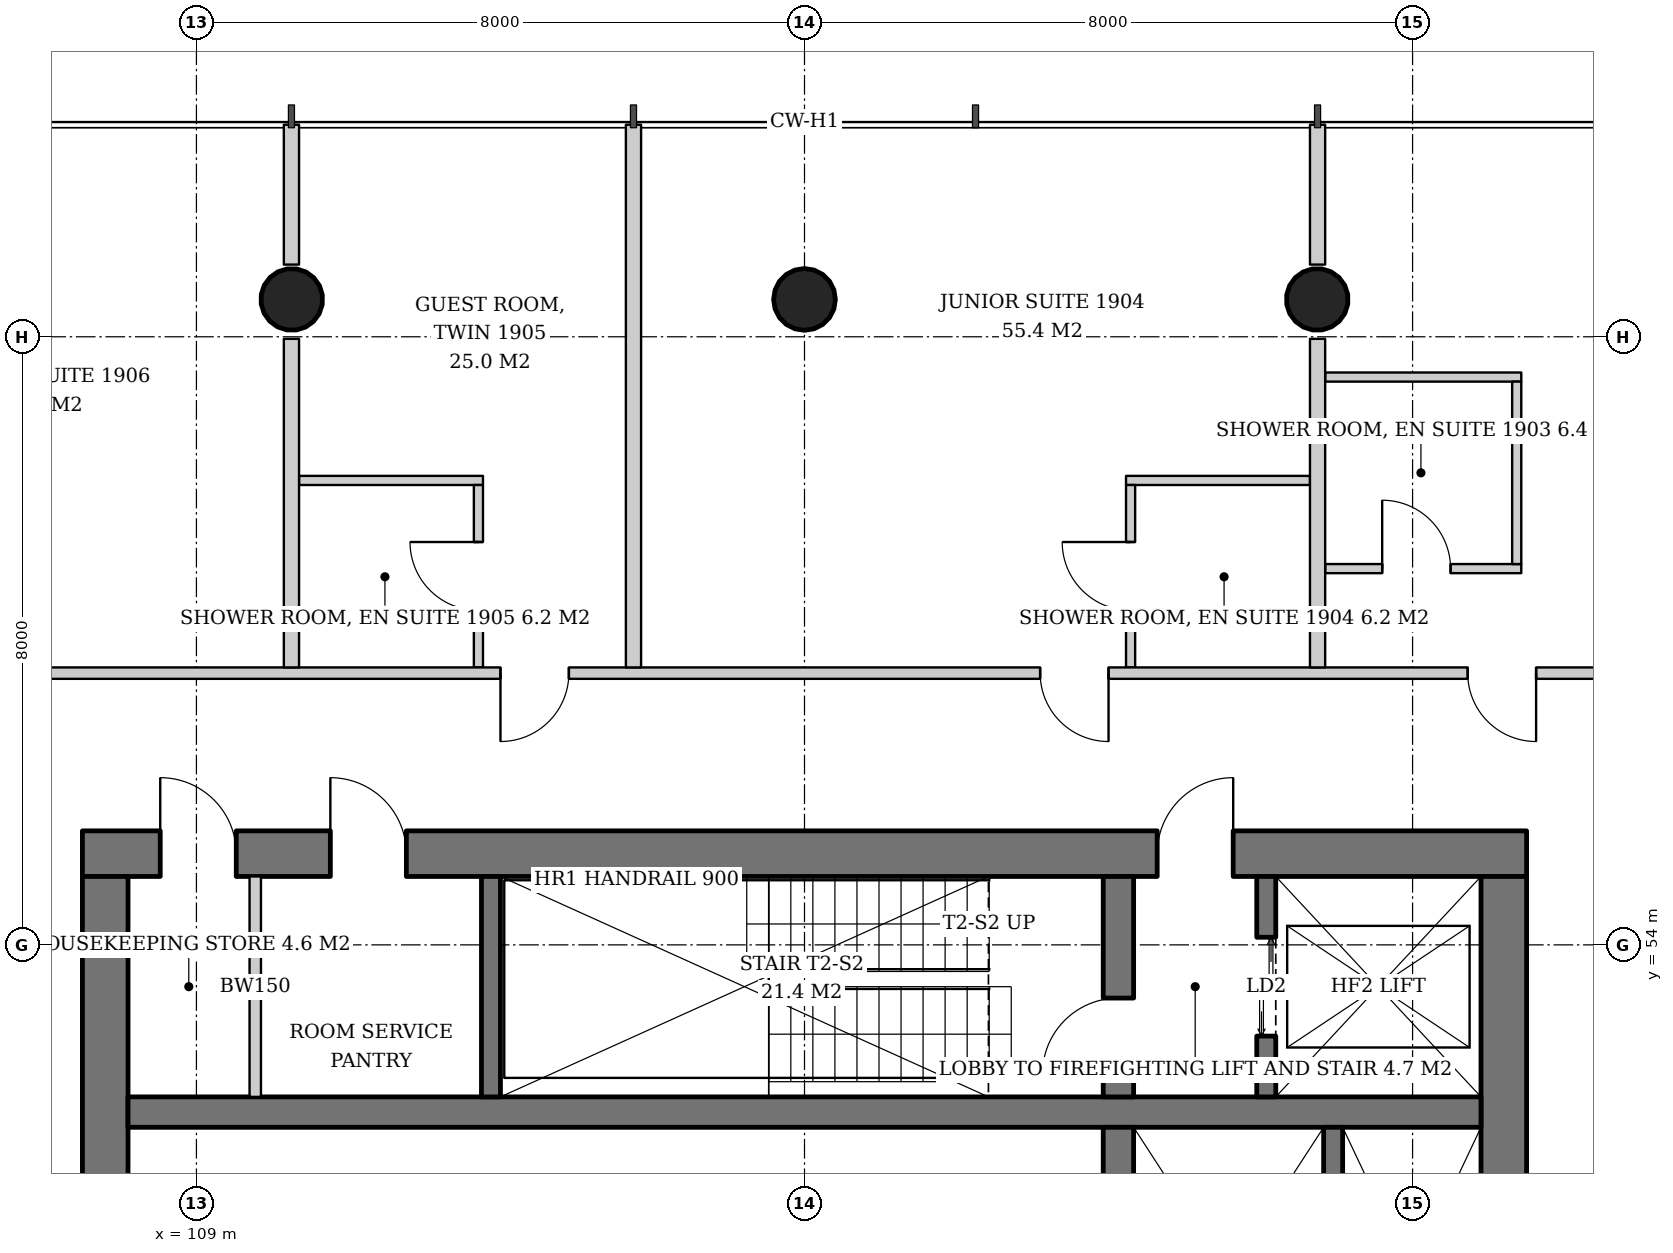
"""IFC4 building model, lengths in metres.
Left out: names, types, materials, properties, quantities, classifications, styles, units other than length and angle.
Written with IfcOpenShell. Run it as: python <this file> out.ifc"""

import sys

from ifc_helpers import new_model, si_unit, direction, frame, frame_2d, origin, origin_2d, place, context, subcontext, project, spatial, rectangle, hollow_circle, extrude, element, fill, save


model = new_model("IFC4")
c1 = context("Model", 3, precision=1e-05, world=origin(), true_north=direction((0.0, 1.0)))
c2 = subcontext(c1, "Body", "Model", "MODEL_VIEW")
j1 = project(units=[si_unit("LENGTHUNIT", "METRE"), si_unit("PLANEANGLEUNIT", "RADIAN")], contexts=[c1])
p1 = place(None, origin())
s1 = spatial("IfcSite", under=j1, at=p1, CompositionType="ELEMENT")
p2 = place(p1, origin())
s2 = spatial("IfcBuilding", under=s1, at=p2, CompositionType="ELEMENT")
p3 = place(p2, frame((0.0, 0.0, 78.0)))
s3 = spatial("IfcBuildingStorey", under=s2, at=p3, CompositionType="ELEMENT", Elevation=78.0)
p4 = place(p3, frame((123.771, 62.543, 0.0), z_axis=(-0.021497706284, -0.043059584825, 0.998841188968), x_axis=(0.894693706707, -0.446680166538, 0.0)))
e1 = element("IfcColumn", 1, at=p4, inside=s3, PredefinedType="COLUMN", context=c2, shape_type="SweptSolid", body=[
    extrude(hollow_circle(Radius=0.406, WallThickness=0.03, at=origin_2d()), origin(), (0.0, 0.0, 1.0), 3.804),
])
p5 = place(p3, frame((117.0, 62.543, 0.0), z_axis=(0.0, -0.043069538298, 0.999072076915), x_axis=(1.0, 0.0, 0.0)))
e2 = element("IfcColumn", 2, at=p5, inside=s3, PredefinedType="COLUMN", context=c2, shape_type="SweptSolid", body=[
    extrude(hollow_circle(Radius=0.406, WallThickness=0.03, at=origin_2d()), origin(), (0.0, 0.0, 1.0), 3.803),
])
p6 = place(p3, frame((110.229, 62.543, 0.0), z_axis=(0.021497706284, -0.043059584825, 0.998841188968), x_axis=(0.894693706707, 0.446680166538, 0.0)))
e3 = element("IfcColumn", 3, at=p6, inside=s3, PredefinedType="COLUMN", context=c2, shape_type="SweptSolid", body=[
    extrude(hollow_circle(Radius=0.406, WallThickness=0.03, at=origin_2d()), origin(), (0.0, 0.0, 1.0), 3.804),
])
p7 = place(p3, frame((107.5, 55.2, 0.0), z_axis=(0.0, 0.0, 1.0), x_axis=(1.0, 0.0, 0.0)))
e4 = element("IfcWall", 4, at=p7, inside=s3, PredefinedType="SHEAR", context=c2, shape_type="SweptSolid", body=[
    extrude(rectangle(XDim=19.0, YDim=0.6, at=frame_2d((9.5, 0.0))), origin(), (0.0, 0.0, 1.0), 3.8),
])
p8 = place(p7, frame((14.14, 0.0, 0.0)))
e5 = element("IfcOpeningElement", 5, at=p8, cuts=e4, PredefinedType="OPENING", context=c2, shape_type="SweptSolid", body=[
    extrude(rectangle(XDim=1.0, YDim=2.1, at=frame_2d((0.5, 1.05))), frame((0.0, 0.31, 0.0), z_axis=(0.0, -1.0, 0.0), x_axis=(1.0, 0.0, 0.0)), (0.0, 0.0, 1.0), 0.62),
])
p9 = place(p7, frame((1.024, 0.0, 0.0)))
e6 = element("IfcOpeningElement", 6, at=p9, cuts=e4, PredefinedType="OPENING", context=c2, shape_type="SweptSolid", body=[
    extrude(rectangle(XDim=1.0, YDim=2.1, at=frame_2d((0.5, 1.05))), frame((0.0, 0.31, 0.0), z_axis=(0.0, -1.0, 0.0), x_axis=(1.0, 0.0, 0.0)), (0.0, 0.0, 1.0), 0.62),
])
p10 = place(p7, frame((3.262, 0.0, 0.0)))
e7 = element("IfcOpeningElement", 7, at=p10, cuts=e4, PredefinedType="OPENING", context=c2, shape_type="SweptSolid", body=[
    extrude(rectangle(XDim=1.0, YDim=2.1, at=frame_2d((0.5, 1.05))), frame((0.0, 0.31, 0.0), z_axis=(0.0, -1.0, 0.0), x_axis=(1.0, 0.0, 0.0)), (0.0, 0.0, 1.0), 0.62),
])
p11 = place(p3, frame((107.8, 37.1, 0.0), z_axis=(0.0, 0.0, 1.0), x_axis=(0.0, 1.0, 0.0)))
e8 = element("IfcWall", 8, at=p11, inside=s3, PredefinedType="SHEAR", context=c2, shape_type="SweptSolid", body=[
    extrude(rectangle(XDim=17.8, YDim=0.6, at=frame_2d((8.9, 0.0))), origin(), (0.0, 0.0, 1.0), 3.8),
])
p12 = place(p11, frame((8.0, 0.0, 0.0)))
e9 = element("IfcOpeningElement", 9, at=p12, cuts=e8, PredefinedType="OPENING", context=c2, shape_type="SweptSolid", body=[
    extrude(rectangle(XDim=1.8, YDim=2.4, at=frame_2d((0.9, 1.2))), frame((0.0, 0.31, 0.0), z_axis=(0.0, -1.0, 0.0), x_axis=(1.0, 0.0, 0.0)), (0.0, 0.0, 1.0), 0.62),
])
p13 = place(p3, frame((126.2, 37.1, 0.0), z_axis=(0.0, 0.0, 1.0), x_axis=(0.0, 1.0, 0.0)))
e10 = element("IfcWall", 10, at=p13, inside=s3, PredefinedType="SHEAR", context=c2, shape_type="SweptSolid", body=[
    extrude(rectangle(XDim=17.8, YDim=0.6, at=frame_2d((8.9, 0.0))), origin(), (0.0, 0.0, 1.0), 3.8),
])
p14 = place(p13, frame((8.0, 0.0, 0.0)))
e11 = element("IfcOpeningElement", 11, at=p14, cuts=e10, PredefinedType="OPENING", context=c2, shape_type="SweptSolid", body=[
    extrude(rectangle(XDim=1.8, YDim=2.4, at=frame_2d((0.9, 1.2))), frame((0.0, 0.31, 0.0), z_axis=(0.0, -1.0, 0.0), x_axis=(1.0, 0.0, 0.0)), (0.0, 0.0, 1.0), 0.62),
])
p15 = place(p3, frame((108.1, 51.8, 0.0), z_axis=(0.0, 0.0, 1.0), x_axis=(1.0, 0.0, 0.0)))
e12 = element("IfcWall", 12, at=p15, inside=s3, PredefinedType="SHEAR", context=c2, shape_type="SweptSolid", body=[
    extrude(rectangle(XDim=17.8, YDim=0.4, at=frame_2d((8.9, 0.0))), origin(), (0.0, 0.0, 1.0), 3.8),
])
p16 = place(p3, frame((121.13, 40.4, 0.0), z_axis=(0.0, 0.0, 1.0), x_axis=(0.0, 1.0, 0.0)))
e13 = element("IfcWall", 13, at=p16, inside=s3, PredefinedType="SHEAR", context=c2, shape_type="SweptSolid", body=[
    extrude(rectangle(XDim=11.2, YDim=0.4, at=frame_2d((5.6, 0.0))), origin(), (0.0, 0.0, 1.0), 3.8),
])
p17 = place(p3, frame((121.13, 52.0, 0.0), z_axis=(0.0, 0.0, 1.0), x_axis=(0.0, 1.0, 0.0)))
e14 = element("IfcWall", 14, at=p17, inside=s3, PredefinedType="SHEAR", context=c2, shape_type="SweptSolid", body=[
    extrude(rectangle(XDim=2.9, YDim=0.4, at=frame_2d((1.45, 0.0))), origin(), (0.0, 0.0, 1.0), 3.8),
])
p18 = place(p17, frame((0.3, 0.0, 0.0)))
e15 = element("IfcOpeningElement", 15, at=p18, cuts=e14, PredefinedType="OPENING", context=c2, shape_type="SweptSolid", body=[
    extrude(rectangle(XDim=1.0, YDim=2.1, at=frame_2d((0.5, 1.05))), frame((0.0, 0.21, 0.0), z_axis=(0.0, -1.0, 0.0), x_axis=(1.0, 0.0, 0.0)), (0.0, 0.0, 1.0), 0.42),
])
p19 = place(p3, frame((112.875, 52.0, 0.0), z_axis=(0.0, 0.0, 1.0), x_axis=(0.0, 1.0, 0.0)))
e16 = element("IfcWall", 16, at=p19, inside=s3, PredefinedType="SHEAR", context=c2, shape_type="SweptSolid", body=[
    extrude(rectangle(XDim=2.9, YDim=0.25, at=frame_2d((1.45, 0.0))), origin(), (0.0, 0.0, 1.0), 3.8),
])
p20 = place(p3, frame((123.075, 52.0, 0.0), z_axis=(0.0, 0.0, 1.0), x_axis=(0.0, 1.0, 0.0)))
e17 = element("IfcWall", 17, at=p20, inside=s3, PredefinedType="SHEAR", context=c2, shape_type="SweptSolid", body=[
    extrude(rectangle(XDim=2.9, YDim=0.25, at=frame_2d((1.45, 0.0))), origin(), (0.0, 0.0, 1.0), 3.8),
])
p21 = place(p20, frame((0.8, 0.0, 0.0)))
e18 = element("IfcOpeningElement", 18, at=p21, cuts=e17, PredefinedType="OPENING", context=c2, shape_type="SweptSolid", body=[
    extrude(rectangle(XDim=1.3, YDim=2.2, at=frame_2d((0.65, 1.1))), frame((0.0, 0.135, 0.0), z_axis=(0.0, -1.0, 0.0), x_axis=(1.0, 0.0, 0.0)), (0.0, 0.0, 1.0), 0.27),
])
p22 = place(p3, frame((123.955, 47.75, 0.0), z_axis=(0.0, 0.0, 1.0), x_axis=(0.0, 1.0, 0.0)))
e19 = element("IfcWall", 19, at=p22, inside=s3, PredefinedType="SHEAR", context=c2, shape_type="SweptSolid", body=[
    extrude(rectangle(XDim=3.85, YDim=0.25, at=frame_2d((1.925, 0.0))), origin(), (0.0, 0.0, 1.0), 3.8),
])
p23 = place(p3, frame((109.774, 52.0, 0.0), z_axis=(0.0, 0.0, 1.0), x_axis=(0.0, 1.0, 0.0)))
e20 = element("IfcWall", 20, at=p23, inside=s3, PredefinedType="SOLIDWALL", context=c2, shape_type="SweptSolid", body=[
    extrude(rectangle(XDim=2.9, YDim=0.15, at=frame_2d((1.45, 0.0))), origin(), (0.0, 0.0, 1.0), 3.52),
])
p24 = place(p3, frame((123.85, 58.95, 0.0), z_axis=(0.0, 0.0, 1.0), x_axis=(1.0, 0.0, 0.0)))
e21 = element("IfcWall", 21, at=p24, inside=s3, PredefinedType="PARTITIONING", context=c2, shape_type="SweptSolid", body=[
    extrude(rectangle(XDim=2.58, YDim=0.12, at=frame_2d((1.29, 0.0))), origin(), (0.0, 0.0, 1.0), 2.82),
])
p25 = place(p24, frame((0.75, 0.0, 0.0)))
e22 = element("IfcOpeningElement", 22, at=p25, cuts=e21, PredefinedType="OPENING", context=c2, shape_type="SweptSolid", body=[
    extrude(rectangle(XDim=0.9, YDim=2.1, at=frame_2d((0.45, 1.05))), frame((0.0, 0.07, 0.0), z_axis=(0.0, -1.0, 0.0), x_axis=(1.0, 0.0, 0.0)), (0.0, 0.0, 1.0), 0.14),
])
p26 = place(p3, frame((123.85, 61.47, 0.0), z_axis=(0.0, 0.0, 1.0), x_axis=(1.0, 0.0, 0.0)))
e23 = element("IfcWall", 23, at=p26, inside=s3, PredefinedType="PARTITIONING", context=c2, shape_type="SweptSolid", body=[
    extrude(rectangle(XDim=2.58, YDim=0.12, at=frame_2d((1.29, 0.0))), origin(), (0.0, 0.0, 1.0), 2.82),
])
p27 = place(p3, frame((126.37, 59.01, 0.0), z_axis=(0.0, 0.0, 1.0), x_axis=(0.0, 1.0, 0.0)))
e24 = element("IfcWall", 24, at=p27, inside=s3, PredefinedType="PARTITIONING", context=c2, shape_type="SweptSolid", body=[
    extrude(rectangle(XDim=2.4, YDim=0.12, at=frame_2d((1.2, 0.0))), origin(), (0.0, 0.0, 1.0), 2.82),
])
p28 = place(p3, frame((123.65, 60.11, 0.0), z_axis=(0.0, 0.0, 1.0), x_axis=(-1.0, 0.0, 0.0)))
e25 = element("IfcWall", 25, at=p28, inside=s3, PredefinedType="PARTITIONING", context=c2, shape_type="SweptSolid", body=[
    extrude(rectangle(XDim=2.42, YDim=0.12, at=frame_2d((1.21, 0.0))), origin(), (0.0, 0.0, 1.0), 2.72),
])
p29 = place(p3, frame((121.29, 57.65, 0.0), z_axis=(0.0, 0.0, 1.0), x_axis=(0.0, 1.0, 0.0)))
e26 = element("IfcWall", 26, at=p29, inside=s3, PredefinedType="PARTITIONING", context=c2, shape_type="SweptSolid", body=[
    extrude(rectangle(XDim=2.4, YDim=0.12, at=frame_2d((1.2, 0.0))), origin(), (0.0, 0.0, 1.0), 3.52),
])
p30 = place(p29, frame((0.75, 0.0, 0.0)))
e27 = element("IfcOpeningElement", 27, at=p30, cuts=e26, PredefinedType="OPENING", context=c2, shape_type="SweptSolid", body=[
    extrude(rectangle(XDim=0.9, YDim=2.1, at=frame_2d((0.45, 1.05))), frame((0.0, 0.07, 0.0), z_axis=(0.0, -1.0, 0.0), x_axis=(1.0, 0.0, 0.0)), (0.0, 0.0, 1.0), 0.14),
])
p31 = place(p3, frame((112.77, 60.11, 0.0), z_axis=(0.0, 0.0, 1.0), x_axis=(-1.0, 0.0, 0.0)))
e28 = element("IfcWall", 28, at=p31, inside=s3, PredefinedType="PARTITIONING", context=c2, shape_type="SweptSolid", body=[
    extrude(rectangle(XDim=2.42, YDim=0.12, at=frame_2d((1.21, 0.0))), origin(), (0.0, 0.0, 1.0), 3.52),
])
p32 = place(p3, frame((112.71, 57.65, 0.0), z_axis=(0.0, 0.0, 1.0), x_axis=(0.0, 1.0, 0.0)))
e29 = element("IfcWall", 29, at=p32, inside=s3, PredefinedType="PARTITIONING", context=c2, shape_type="SweptSolid", body=[
    extrude(rectangle(XDim=2.4, YDim=0.12, at=frame_2d((1.2, 0.0))), origin(), (0.0, 0.0, 1.0), 3.52),
])
p33 = place(p32, frame((0.75, 0.0, 0.0)))
e30 = element("IfcOpeningElement", 30, at=p33, cuts=e29, PredefinedType="OPENING", context=c2, shape_type="SweptSolid", body=[
    extrude(rectangle(XDim=0.9, YDim=2.1, at=frame_2d((0.45, 1.05))), frame((0.0, 0.07, 0.0), z_axis=(0.0, -1.0, 0.0), x_axis=(1.0, 0.0, 0.0)), (0.0, 0.0, 1.0), 0.14),
])
p34 = place(p3, frame((128.65, 57.575, 0.0), z_axis=(0.0, 0.0, 1.0), x_axis=(-1.0, 0.0, 0.0)))
e31 = element("IfcWall", 31, at=p34, inside=s3, PredefinedType="PARTITIONING", context=c2, shape_type="SweptSolid", body=[
    extrude(rectangle(XDim=23.15, YDim=0.15, at=frame_2d((11.575, 0.0))), origin(), (0.0, 0.0, 1.0), 2.72),
])
p35 = place(p34, frame((2.025, 0.0, 0.0)))
e32 = element("IfcOpeningElement", 32, at=p35, cuts=e31, PredefinedType="OPENING", context=c2, shape_type="SweptSolid", body=[
    extrude(rectangle(XDim=0.9, YDim=2.1, at=frame_2d((0.45, 1.05))), frame((0.0, 0.085, 0.0), z_axis=(0.0, -1.0, 0.0), x_axis=(1.0, 0.0, 0.0)), (0.0, 0.0, 1.0), 0.17),
])
p36 = place(p34, frame((7.65, 0.0, 0.0)))
e33 = element("IfcOpeningElement", 33, at=p36, cuts=e31, PredefinedType="OPENING", context=c2, shape_type="SweptSolid", body=[
    extrude(rectangle(XDim=0.9, YDim=2.1, at=frame_2d((0.45, 1.05))), frame((0.0, 0.085, 0.0), z_axis=(0.0, -1.0, 0.0), x_axis=(1.0, 0.0, 0.0)), (0.0, 0.0, 1.0), 0.17),
])
p37 = place(p34, frame((14.75, 0.0, 0.0)))
e34 = element("IfcOpeningElement", 34, at=p37, cuts=e31, PredefinedType="OPENING", context=c2, shape_type="SweptSolid", body=[
    extrude(rectangle(XDim=0.9, YDim=2.1, at=frame_2d((0.45, 1.05))), frame((0.0, 0.085, 0.0), z_axis=(0.0, -1.0, 0.0), x_axis=(1.0, 0.0, 0.0)), (0.0, 0.0, 1.0), 0.17),
])
p38 = place(p3, frame((123.75, 57.65, 0.0), z_axis=(0.0, 0.0, 1.0), x_axis=(0.0, 1.0, 0.0)))
e35 = element("IfcWall", 35, at=p38, inside=s3, PredefinedType="PARTITIONING", context=c2, shape_type="SweptSolid", body=[
    extrude(rectangle(XDim=4.323, YDim=0.2, at=frame_2d((2.162, 0.0))), origin(), (0.0, 0.0, 1.0), 3.52),
])
p39 = place(p3, frame((123.75, 62.95, 0.0), z_axis=(0.0, 0.0, 1.0), x_axis=(0.0, 1.0, 0.0)))
e36 = element("IfcWall", 36, at=p39, inside=s3, PredefinedType="PARTITIONING", context=c2, shape_type="SweptSolid", body=[
    extrude(rectangle(XDim=1.84, YDim=0.2, at=frame_2d((0.92, 0.0))), origin(), (0.0, 0.0, 1.0), 3.52),
])
p40 = place(p3, frame((114.75, 57.65, 0.0), z_axis=(0.0, 0.0, 1.0), x_axis=(0.0, 1.0, 0.0)))
e37 = element("IfcWall", 37, at=p40, inside=s3, PredefinedType="PARTITIONING", context=c2, shape_type="SweptSolid", body=[
    extrude(rectangle(XDim=7.14, YDim=0.2, at=frame_2d((3.57, 0.0))), origin(), (0.0, 0.0, 1.0), 3.12),
])
p41 = place(p3, frame((110.25, 57.65, 0.0), z_axis=(0.0, 0.0, 1.0), x_axis=(0.0, 1.0, 0.0)))
e38 = element("IfcWall", 38, at=p41, inside=s3, PredefinedType="PARTITIONING", context=c2, shape_type="SweptSolid", body=[
    extrude(rectangle(XDim=4.323, YDim=0.2, at=frame_2d((2.162, 0.0))), origin(), (0.0, 0.0, 1.0), 3.52),
])
p42 = place(p3, frame((110.25, 62.95, 0.0), z_axis=(0.0, 0.0, 1.0), x_axis=(0.0, 1.0, 0.0)))
e39 = element("IfcWall", 39, at=p42, inside=s3, PredefinedType="PARTITIONING", context=c2, shape_type="SweptSolid", body=[
    extrude(rectangle(XDim=1.84, YDim=0.2, at=frame_2d((0.92, 0.0))), origin(), (0.0, 0.0, 1.0), 3.52),
])
p43 = place(p21, origin())
e40 = element("IfcDoor", 40, at=p43, inside=s3, OperationType="DOUBLE_DOOR_SLIDING", PredefinedType="DOOR", context=c2, shape_type="SweptSolid", body=[
    extrude(rectangle(XDim=1.3, YDim=2.2, at=frame_2d((0.65, 1.1))), frame((0.0, 0.025, 0.0), z_axis=(0.0, -1.0, 0.0), x_axis=(1.0, 0.0, 0.0)), (0.0, 0.0, 1.0), 0.05),
])
fill(e18, e40)
p44 = place(p18, origin())
e41 = element("IfcDoor", 41, at=p44, inside=s3, OperationType="SINGLE_SWING_LEFT", PredefinedType="DOOR", context=c2, shape_type="SweptSolid", body=[
    extrude(rectangle(XDim=1.0, YDim=2.1, at=frame_2d((0.5, 1.05))), frame((0.0, 0.025, 0.0), z_axis=(0.0, -1.0, 0.0), x_axis=(1.0, 0.0, 0.0)), (0.0, 0.0, 1.0), 0.05),
])
fill(e15, e41)
p45 = place(p8, origin())
e42 = element("IfcDoor", 42, at=p45, inside=s3, OperationType="SINGLE_SWING_RIGHT", PredefinedType="DOOR", context=c2, shape_type="SweptSolid", body=[
    extrude(rectangle(XDim=1.0, YDim=2.1, at=frame_2d((0.5, 1.05))), frame((0.0, 0.025, 0.0), z_axis=(0.0, -1.0, 0.0), x_axis=(1.0, 0.0, 0.0)), (0.0, 0.0, 1.0), 0.05),
])
fill(e5, e42)
p46 = place(p9, origin())
e43 = element("IfcDoor", 43, at=p46, inside=s3, OperationType="SINGLE_SWING_LEFT", PredefinedType="DOOR", context=c2, shape_type="SweptSolid", body=[
    extrude(rectangle(XDim=1.0, YDim=2.1, at=frame_2d((0.5, 1.05))), frame((0.0, -0.24, 0.0), z_axis=(0.0, -1.0, 0.0), x_axis=(1.0, 0.0, 0.0)), (0.0, 0.0, 1.0), 0.05),
])
fill(e6, e43)
p47 = place(p10, origin())
e44 = element("IfcDoor", 44, at=p47, inside=s3, OperationType="SINGLE_SWING_LEFT", PredefinedType="DOOR", context=c2, shape_type="SweptSolid", body=[
    extrude(rectangle(XDim=1.0, YDim=2.1, at=frame_2d((0.5, 1.05))), frame((0.0, -0.24, 0.0), z_axis=(0.0, -1.0, 0.0), x_axis=(1.0, 0.0, 0.0)), (0.0, 0.0, 1.0), 0.05),
])
fill(e7, e44)
p48 = place(p25, origin())
e45 = element("IfcDoor", 45, at=p48, inside=s3, OperationType="SINGLE_SWING_LEFT", PredefinedType="DOOR", context=c2, shape_type="SweptSolid", body=[
    extrude(rectangle(XDim=0.9, YDim=2.1, at=frame_2d((0.45, 1.05))), frame((0.0, 0.025, 0.0), z_axis=(0.0, -1.0, 0.0), x_axis=(1.0, 0.0, 0.0)), (0.0, 0.0, 1.0), 0.05),
])
fill(e22, e45)
p49 = place(p30, origin())
e46 = element("IfcDoor", 46, at=p49, inside=s3, OperationType="SINGLE_SWING_RIGHT", PredefinedType="DOOR", context=c2, shape_type="SweptSolid", body=[
    extrude(rectangle(XDim=0.9, YDim=2.1, at=frame_2d((0.45, 1.05))), frame((0.0, 0.025, 0.0), z_axis=(0.0, -1.0, 0.0), x_axis=(1.0, 0.0, 0.0)), (0.0, 0.0, 1.0), 0.05),
])
fill(e27, e46)
p50 = place(p33, origin())
e47 = element("IfcDoor", 47, at=p50, inside=s3, OperationType="SINGLE_SWING_RIGHT", PredefinedType="DOOR", context=c2, shape_type="SweptSolid", body=[
    extrude(rectangle(XDim=0.9, YDim=2.1, at=frame_2d((0.45, 1.05))), frame((0.0, 0.025, 0.0), z_axis=(0.0, -1.0, 0.0), x_axis=(1.0, 0.0, 0.0)), (0.0, 0.0, 1.0), 0.05),
])
fill(e30, e47)
p51 = place(p35, origin())
e48 = element("IfcDoor", 48, at=p51, inside=s3, OperationType="SINGLE_SWING_LEFT", PredefinedType="DOOR", context=c2, shape_type="SweptSolid", body=[
    extrude(rectangle(XDim=0.9, YDim=2.1, at=frame_2d((0.45, 1.05))), frame((0.0, 0.025, 0.0), z_axis=(0.0, -1.0, 0.0), x_axis=(1.0, 0.0, 0.0)), (0.0, 0.0, 1.0), 0.05),
])
fill(e32, e48)
p52 = place(p36, origin())
e49 = element("IfcDoor", 49, at=p52, inside=s3, OperationType="SINGLE_SWING_LEFT", PredefinedType="DOOR", context=c2, shape_type="SweptSolid", body=[
    extrude(rectangle(XDim=0.9, YDim=2.1, at=frame_2d((0.45, 1.05))), frame((0.0, 0.025, 0.0), z_axis=(0.0, -1.0, 0.0), x_axis=(1.0, 0.0, 0.0)), (0.0, 0.0, 1.0), 0.05),
])
fill(e33, e49)
p53 = place(p37, origin())
e50 = element("IfcDoor", 50, at=p53, inside=s3, OperationType="SINGLE_SWING_RIGHT", PredefinedType="DOOR", context=c2, shape_type="SweptSolid", body=[
    extrude(rectangle(XDim=0.9, YDim=2.1, at=frame_2d((0.45, 1.05))), frame((0.0, 0.025, 0.0), z_axis=(0.0, -1.0, 0.0), x_axis=(1.0, 0.0, 0.0)), (0.0, 0.0, 1.0), 0.05),
])
fill(e34, e50)
save(model, sys.argv[1])
